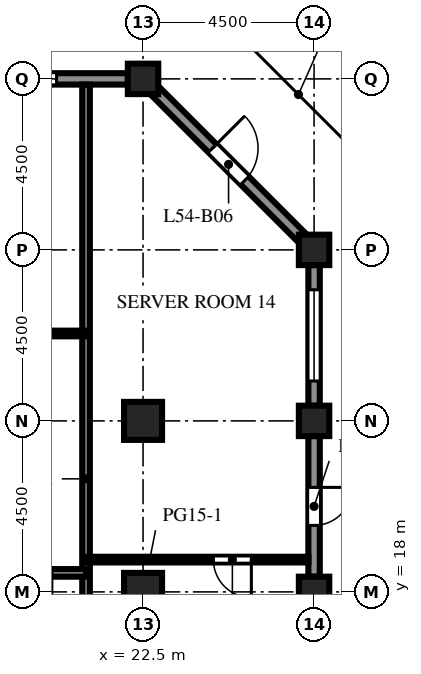
"""IFC4 building model, lengths in metres.
Left out: names, types, materials, properties, quantities, classifications, styles, units other than length and angle.
Written with IfcOpenShell. Run it as: python <this file> out.ifc"""

import sys

from ifc_helpers import new_model, si_unit, direction, frame, frame_2d, origin, origin_2d, place, context, subcontext, project, spatial, rectangle, extrude, element, fill, save


model = new_model("IFC4")
c1 = context("Model", 3, precision=1e-05, world=origin(), true_north=direction((0.0, 1.0)))
c2 = subcontext(c1, "Body", "Model", "MODEL_VIEW")
j1 = project(units=[si_unit("LENGTHUNIT", "METRE"), si_unit("PLANEANGLEUNIT", "RADIAN")], contexts=[c1])
p1 = place(None, origin())
s1 = spatial("IfcSite", under=j1, at=p1, CompositionType="ELEMENT")
p2 = place(p1, origin())
s2 = spatial("IfcBuilding", under=s1, at=p2, CompositionType="ELEMENT")
p3 = place(p2, frame((0.0, 0.0, 239.8)))
s3 = spatial("IfcBuildingStorey", under=s2, at=p3, CompositionType="ELEMENT", Elevation=239.8)
for number, where, z_axis, x_axis in (
    (1, (22.5, 31.5, 0.0), (0.0, 0.0, 1.0), (1.0, 0.0, 0.0)),
    (2, (27.0, 18.0, 0.0), (0.0, 0.0, 1.0), (1.0, 0.0, 0.0)),
    (3, (27.0, 22.5, 0.0), (0.0, 0.0, 1.0), (1.0, 0.0, 0.0)),
    (4, (27.0, 27.0, 0.0), (0.0, 0.0, 1.0), (1.0, 0.0, 0.0)),
):
    element("IfcColumn", number, at=place(p3, frame(where, z_axis=z_axis, x_axis=x_axis)), inside=s3, PredefinedType="COLUMN", context=c2, shape_type="SweptSolid", body=[
        extrude(rectangle(XDim=0.8, YDim=0.8, at=origin_2d()), origin(), (0.0, 0.0, 1.0), 4.1),
    ])
for number, where, z_axis, x_axis in (
    (5, (22.5, 18.0, 0.0), (0.0, 0.0, 1.0), (1.0, 0.0, 0.0)),
    (6, (22.5, 22.5, 0.0), (0.0, 0.0, 1.0), (1.0, 0.0, 0.0)),
):
    element("IfcColumn", number, at=place(p3, frame(where, z_axis=z_axis, x_axis=x_axis)), inside=s3, PredefinedType="COLUMN", context=c2, shape_type="SweptSolid", body=[
        extrude(rectangle(XDim=1.0, YDim=1.0, at=origin_2d()), origin(), (0.0, 0.0, 1.0), 4.1),
    ])
p4 = place(p3, frame((27.0, 22.1, 0.0), z_axis=(0.0, 0.0, 1.0), x_axis=(0.0, -1.0, 0.0)))
e7 = element("IfcWall", 7, at=p4, inside=s3, PredefinedType="SOLIDWALL", context=c2, shape_type="SweptSolid", body=[
    extrude(rectangle(XDim=3.7, YDim=0.3, at=frame_2d((1.85, 0.0))), origin(), (0.0, 0.0, 1.0), 2.85),
])
p5 = place(p4, frame((1.35, 0.0, 0.0)))
e8 = element("IfcOpeningElement", 8, at=p5, cuts=e7, PredefinedType="OPENING", context=c2, shape_type="SweptSolid", body=[
    extrude(rectangle(XDim=1.0, YDim=2.2, at=frame_2d((0.5, 1.1))), frame((0.0, 0.16, 0.0), z_axis=(0.0, -1.0, 0.0), x_axis=(1.0, 0.0, 0.0)), (0.0, 0.0, 1.0), 0.32),
])
p6 = place(p3, frame((27.0, 26.6, 0.0), z_axis=(0.0, 0.0, 1.0), x_axis=(0.0, -1.0, 0.0)))
e9 = element("IfcWall", 9, at=p6, inside=s3, PredefinedType="SOLIDWALL", context=c2, shape_type="SweptSolid", body=[
    extrude(rectangle(XDim=3.7, YDim=0.3, at=frame_2d((1.85, 0.0))), origin(), (0.0, 0.0, 1.0), 2.85),
])
p7 = place(p6, frame((0.65, 0.0, 0.8)))
e10 = element("IfcOpeningElement", 10, at=p7, cuts=e9, PredefinedType="OPENING", context=c2, shape_type="SweptSolid", body=[
    extrude(rectangle(XDim=2.4, YDim=1.7, at=frame_2d((1.2, 0.85))), frame((0.0, 0.16, 0.0), z_axis=(0.0, -1.0, 0.0), x_axis=(1.0, 0.0, 0.0)), (0.0, 0.0, 1.0), 0.32),
])
p8 = place(p3, frame((22.794, 31.206, 0.0), z_axis=(0.0, 0.0, 1.0), x_axis=(0.707106781187, -0.707106781187, 0.0)))
e11 = element("IfcWall", 11, at=p8, inside=s3, PredefinedType="SOLIDWALL", context=c2, shape_type="SweptSolid", body=[
    extrude(rectangle(XDim=5.532, YDim=0.3, at=frame_2d((2.766, 0.0))), origin(), (0.0, 0.0, 1.0), 2.85),
])
p9 = place(p8, frame((2.166, 0.0, 0.0)))
e12 = element("IfcOpeningElement", 12, at=p9, cuts=e11, PredefinedType="OPENING", context=c2, shape_type="SweptSolid", body=[
    extrude(rectangle(XDim=1.2, YDim=2.2, at=frame_2d((0.6, 1.1))), frame((0.0, 0.16, 0.0), z_axis=(0.0, -1.0, 0.0), x_axis=(1.0, 0.0, 0.0)), (0.0, 0.0, 1.0), 0.32),
])
p10 = place(p3, frame((18.4, 31.5, 0.0), z_axis=(0.0, 0.0, 1.0), x_axis=(1.0, 0.0, 0.0)))
e13 = element("IfcWall", 13, at=p10, inside=s3, PredefinedType="SOLIDWALL", context=c2, shape_type="SweptSolid", body=[
    extrude(rectangle(XDim=3.7, YDim=0.3, at=frame_2d((1.85, 0.0))), origin(), (0.0, 0.0, 1.0), 2.85),
])
p11 = place(p10, frame((0.625, 0.0, 0.8)))
e14 = element("IfcOpeningElement", 14, at=p11, cuts=e13, PredefinedType="OPENING", context=c2, shape_type="SweptSolid", body=[
    extrude(rectangle(XDim=1.2, YDim=1.7, at=frame_2d((0.6, 0.85))), frame((0.0, 0.16, 0.0), z_axis=(0.0, -1.0, 0.0), x_axis=(1.0, 0.0, 0.0)), (0.0, 0.0, 1.0), 0.32),
])
p12 = place(p3, frame((21.0, 31.35, 0.0), z_axis=(0.0, 0.0, 1.0), x_axis=(0.0, -1.0, 0.0)))
e15 = element("IfcWall", 15, at=p12, inside=s3, PredefinedType="PARTITIONING", context=c2, shape_type="SweptSolid", body=[
    extrude(rectangle(XDim=25.1, YDim=0.2, at=frame_2d((12.55, 0.0))), origin(), (0.0, 0.0, 1.0), 3.65),
])
p13 = place(p12, frame((20.75, 0.0, 0.0)))
e16 = element("IfcOpeningElement", 16, at=p13, cuts=e15, PredefinedType="OPENING", context=c2, shape_type="SweptSolid", body=[
    extrude(rectangle(XDim=1.0, YDim=2.1, at=frame_2d((0.5, 1.05))), frame((0.0, 0.11, 0.0), z_axis=(0.0, -1.0, 0.0), x_axis=(1.0, 0.0, 0.0)), (0.0, 0.0, 1.0), 0.22),
])
p14 = place(p3, frame((18.0, 18.5, 0.0), z_axis=(0.0, 0.0, 1.0), x_axis=(1.0, 0.0, 0.0)))
e17 = element("IfcWall", 17, at=p14, inside=s3, PredefinedType="PARTITIONING", context=c2, shape_type="SweptSolid", body=[
    extrude(rectangle(XDim=3.0, YDim=0.2, at=frame_2d((1.5, 0.0))), origin(), (0.0, 0.0, 1.0), 3.65),
])
p15 = place(p14, frame((1.1, 0.0, 0.0)))
e18 = element("IfcOpeningElement", 18, at=p15, cuts=e17, PredefinedType="OPENING", context=c2, shape_type="SweptSolid", body=[
    extrude(rectangle(XDim=1.0, YDim=2.1, at=frame_2d((0.5, 1.05))), frame((0.0, 0.11, 0.0), z_axis=(0.0, -1.0, 0.0), x_axis=(1.0, 0.0, 0.0)), (0.0, 0.0, 1.0), 0.22),
])
p16 = place(p3, frame((21.0, 18.85, 0.0), z_axis=(0.0, 0.0, 1.0), x_axis=(1.0, 0.0, 0.0)))
e19 = element("IfcWall", 19, at=p16, inside=s3, PredefinedType="PARTITIONING", context=c2, shape_type="SweptSolid", body=[
    extrude(rectangle(XDim=5.85, YDim=0.15, at=frame_2d((2.925, 0.0))), origin(), (0.0, 0.0, 1.0), 3.65),
])
p17 = place(p16, frame((3.35, 0.0, 0.0)))
e20 = element("IfcOpeningElement", 20, at=p17, cuts=e19, PredefinedType="OPENING", context=c2, shape_type="SweptSolid", body=[
    extrude(rectangle(XDim=1.0, YDim=2.1, at=frame_2d((0.5, 1.05))), frame((0.0, 0.085, 0.0), z_axis=(0.0, -1.0, 0.0), x_axis=(1.0, 0.0, 0.0)), (0.0, 0.0, 1.0), 0.17),
])
p18 = place(p3, frame((-13.5, 24.8, 0.0), z_axis=(0.0, 0.0, 1.0), x_axis=(1.0, 0.0, 0.0)))
e21 = element("IfcWall", 21, at=p18, inside=s3, PredefinedType="PARTITIONING", context=c2, shape_type="SweptSolid", body=[
    extrude(rectangle(XDim=34.5, YDim=0.15, at=frame_2d((17.25, 0.0))), origin(), (0.0, 0.0, 1.0), 3.65),
])
p19 = place(p18, frame((1.6, 0.0, 0.0)))
e22 = element("IfcOpeningElement", 22, at=p19, cuts=e21, PredefinedType="OPENING", context=c2, shape_type="SweptSolid", body=[
    extrude(rectangle(XDim=1.0, YDim=2.1, at=frame_2d((0.5, 1.05))), frame((0.0, 0.085, 0.0), z_axis=(0.0, -1.0, 0.0), x_axis=(1.0, 0.0, 0.0)), (0.0, 0.0, 1.0), 0.17),
])
p20 = place(p18, frame((10.35, 0.0, 0.0)))
e23 = element("IfcOpeningElement", 23, at=p20, cuts=e21, PredefinedType="OPENING", context=c2, shape_type="SweptSolid", body=[
    extrude(rectangle(XDim=1.0, YDim=2.1, at=frame_2d((0.5, 1.05))), frame((0.0, 0.085, 0.0), z_axis=(0.0, -1.0, 0.0), x_axis=(1.0, 0.0, 0.0)), (0.0, 0.0, 1.0), 0.17),
])
p21 = place(p18, frame((22.35, 0.0, 0.0)))
e24 = element("IfcOpeningElement", 24, at=p21, cuts=e21, PredefinedType="OPENING", context=c2, shape_type="SweptSolid", body=[
    extrude(rectangle(XDim=1.0, YDim=2.1, at=frame_2d((0.5, 1.05))), frame((0.0, 0.085, 0.0), z_axis=(0.0, -1.0, 0.0), x_axis=(1.0, 0.0, 0.0)), (0.0, 0.0, 1.0), 0.17),
])
p22 = place(p18, frame((31.1, 0.0, 0.0)))
e25 = element("IfcOpeningElement", 25, at=p22, cuts=e21, PredefinedType="OPENING", context=c2, shape_type="SweptSolid", body=[
    extrude(rectangle(XDim=1.0, YDim=2.1, at=frame_2d((0.5, 1.05))), frame((0.0, 0.085, 0.0), z_axis=(0.0, -1.0, 0.0), x_axis=(1.0, 0.0, 0.0)), (0.0, 0.0, 1.0), 0.17),
])
p23 = place(p5, origin())
e26 = element("IfcDoor", 26, at=p23, inside=s3, OperationType="SINGLE_SWING_LEFT", PredefinedType="DOOR", context=c2, shape_type="SweptSolid", body=[
    extrude(rectangle(XDim=1.0, YDim=2.2, at=frame_2d((0.5, 1.1))), frame((0.0, 0.025, 0.0), z_axis=(0.0, -1.0, 0.0), x_axis=(1.0, 0.0, 0.0)), (0.0, 0.0, 1.0), 0.05),
])
fill(e8, e26)
p24 = place(p7, origin())
e27 = element("IfcWindow", 27, at=p24, inside=s3, PartitioningType="SINGLE_PANEL", PredefinedType="WINDOW", context=c2, shape_type="SweptSolid", body=[
    extrude(rectangle(XDim=2.4, YDim=1.7, at=frame_2d((1.2, 0.85))), frame((0.0, 0.03, 0.0), z_axis=(0.0, -1.0, 0.0), x_axis=(1.0, 0.0, 0.0)), (0.0, 0.0, 1.0), 0.06),
])
fill(e10, e27)
p25 = place(p9, origin())
e28 = element("IfcDoor", 28, at=p25, inside=s3, OperationType="SINGLE_SWING_LEFT", PredefinedType="DOOR", context=c2, shape_type="SweptSolid", body=[
    extrude(rectangle(XDim=1.2, YDim=2.2, at=frame_2d((0.6, 1.1))), frame((0.0, 0.025, 0.0), z_axis=(0.0, -1.0, 0.0), x_axis=(1.0, 0.0, 0.0)), (0.0, 0.0, 1.0), 0.05),
])
fill(e12, e28)
p26 = place(p11, origin())
e29 = element("IfcWindow", 29, at=p26, inside=s3, PartitioningType="SINGLE_PANEL", PredefinedType="WINDOW", context=c2, shape_type="SweptSolid", body=[
    extrude(rectangle(XDim=1.2, YDim=1.7, at=frame_2d((0.6, 0.85))), frame((0.0, 0.03, 0.0), z_axis=(0.0, -1.0, 0.0), x_axis=(1.0, 0.0, 0.0)), (0.0, 0.0, 1.0), 0.06),
])
fill(e14, e29)
p27 = place(p17, origin())
e30 = element("IfcDoor", 30, at=p27, inside=s3, OperationType="SINGLE_SWING_RIGHT", PredefinedType="DOOR", context=c2, shape_type="SweptSolid", body=[
    extrude(rectangle(XDim=1.0, YDim=2.1, at=frame_2d((0.5, 1.05))), frame((0.0, 0.025, 0.0), z_axis=(0.0, -1.0, 0.0), x_axis=(1.0, 0.0, 0.0)), (0.0, 0.0, 1.0), 0.05),
])
fill(e20, e30)
save(model, sys.argv[1])
